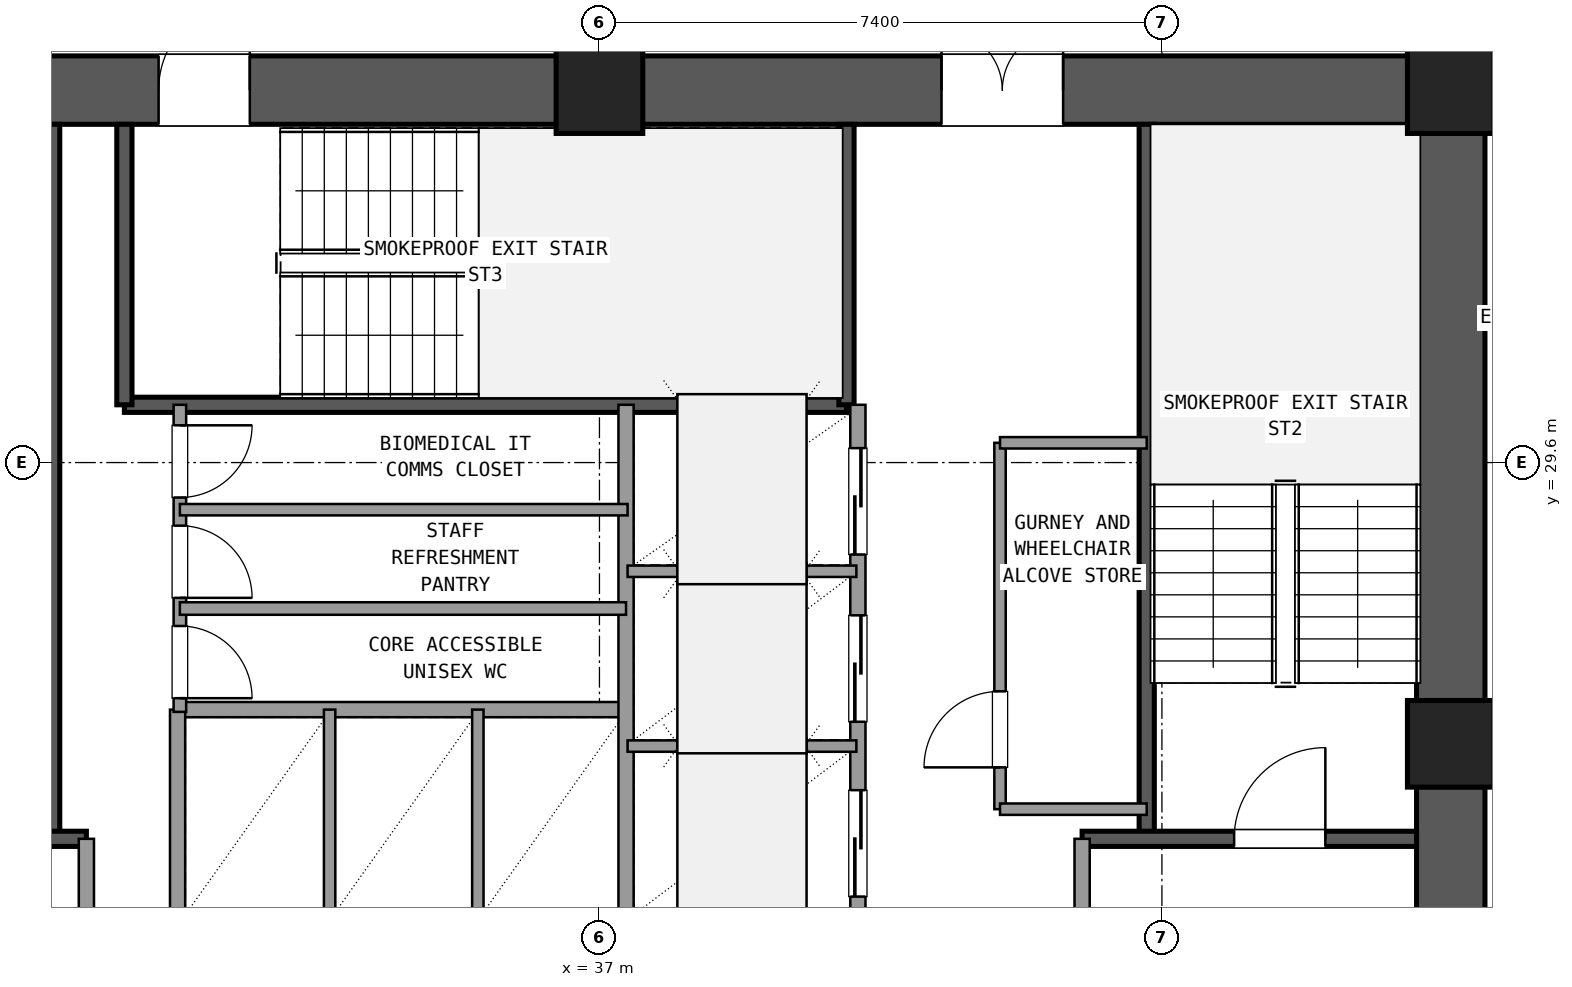
"""IFC4 building model, lengths in metres.
Left out: names, types, materials, properties, quantities, classifications, styles, units other than length and angle.
Written with IfcOpenShell. Run it as: python <this file> out.ifc"""

import sys

from ifc_helpers import new_model, si_unit, direction, frame, frame_2d, origin, origin_2d, place, context, subcontext, project, spatial, rectangle, extrude, element, fill, save


model = new_model("IFC4")
c1 = context("Model", 3, precision=1e-05, world=origin(), true_north=direction((0.0, 1.0)))
c2 = subcontext(c1, "Body", "Model", "MODEL_VIEW")
j1 = project(units=[si_unit("LENGTHUNIT", "METRE"), si_unit("PLANEANGLEUNIT", "RADIAN")], contexts=[c1])
p1 = place(None, origin())
s1 = spatial("IfcSite", under=j1, at=p1, CompositionType="ELEMENT")
p2 = place(p1, origin())
s2 = spatial("IfcBuilding", under=s1, at=p2, CompositionType="ELEMENT")
p3 = place(p2, frame((0.0, 0.0, 45.54)))
s3 = spatial("IfcBuildingStorey", under=s2, at=p3, CompositionType="ELEMENT", Elevation=45.54)
for number, where, z_axis, x_axis in (
    (1, (48.2, 25.9, 0.0), (0.0, 0.0, 1.0), (1.0, 0.0, 0.0)),
    (2, (48.2, 34.5, 0.0), (0.0, 0.0, 1.0), (1.0, 0.0, 0.0)),
    (3, (37.0, 34.5, 0.0), (0.0, 0.0, 1.0), (1.0, 0.0, 0.0)),
):
    element("IfcColumn", number, at=place(p3, frame(where, z_axis=z_axis, x_axis=x_axis)), inside=s3, PredefinedType="COLUMN", context=c2, shape_type="SweptSolid", body=[
        extrude(rectangle(XDim=1.14, YDim=1.14, at=origin_2d()), origin(), (0.0, 0.0, 1.0), 3.6),
    ])
p4 = place(p3, frame((48.2, 17.865, 0.0), z_axis=(0.0, 0.0, 1.0), x_axis=(0.0, 1.0, 0.0)))
e4 = element("IfcWall", 4, at=p4, inside=s3, PredefinedType="SHEAR", context=c2, shape_type="SweptSolid", body=[
    extrude(rectangle(XDim=7.47, YDim=0.9, at=frame_2d((3.735, 0.0))), origin(), (0.0, 0.0, 1.0), 3.32),
])
p5 = place(p4, frame((4.185, 0.0, 0.0)))
e5 = element("IfcOpeningElement", 5, at=p5, cuts=e4, PredefinedType="OPENING", context=c2, shape_type="SweptSolid", body=[
    extrude(rectangle(XDim=1.2, YDim=2.15, at=frame_2d((0.6, 1.075))), frame((0.0, 0.46, 0.0), z_axis=(0.0, -1.0, 0.0), x_axis=(1.0, 0.0, 0.0)), (0.0, 0.0, 1.0), 0.92),
])
p6 = place(p3, frame((48.2, 26.465, 0.0), z_axis=(0.0, 0.0, 1.0), x_axis=(0.0, 1.0, 0.0)))
e6 = element("IfcWall", 6, at=p6, inside=s3, PredefinedType="SHEAR", context=c2, shape_type="SweptSolid", body=[
    extrude(rectangle(XDim=7.47, YDim=0.9, at=frame_2d((3.735, 0.0))), origin(), (0.0, 0.0, 1.0), 3.32),
])
p7 = place(p3, frame((47.635, 34.5, 0.0), z_axis=(0.0, 0.0, 1.0), x_axis=(-1.0, 0.0, 0.0)))
e7 = element("IfcWall", 7, at=p7, inside=s3, PredefinedType="SHEAR", context=c2, shape_type="SweptSolid", body=[
    extrude(rectangle(XDim=10.07, YDim=0.9, at=frame_2d((5.035, 0.0))), origin(), (0.0, 0.0, 1.0), 3.32),
])
p8 = place(p7, frame((4.535, 0.0, 0.0)))
e8 = element("IfcOpeningElement", 8, at=p8, cuts=e7, PredefinedType="OPENING", context=c2, shape_type="SweptSolid", body=[
    extrude(rectangle(XDim=1.6, YDim=2.2, at=frame_2d((0.8, 1.1))), frame((0.0, 0.46, 0.0), z_axis=(0.0, -1.0, 0.0), x_axis=(1.0, 0.0, 0.0)), (0.0, 0.0, 1.0), 0.92),
])
p9 = place(p3, frame((36.435, 34.5, 0.0), z_axis=(0.0, 0.0, 1.0), x_axis=(-1.0, 0.0, 0.0)))
e9 = element("IfcWall", 9, at=p9, inside=s3, PredefinedType="SHEAR", context=c2, shape_type="SweptSolid", body=[
    extrude(rectangle(XDim=10.07, YDim=0.9, at=frame_2d((5.035, 0.0))), origin(), (0.0, 0.0, 1.0), 3.32),
])
p10 = place(p9, frame((4.035, 0.0, 0.0)))
e10 = element("IfcOpeningElement", 10, at=p10, cuts=e9, PredefinedType="OPENING", context=c2, shape_type="SweptSolid", body=[
    extrude(rectangle(XDim=1.2, YDim=2.15, at=frame_2d((0.6, 1.075))), frame((0.0, 0.46, 0.0), z_axis=(0.0, -1.0, 0.0), x_axis=(1.0, 0.0, 0.0)), (0.0, 0.0, 1.0), 0.92),
])
p11 = place(p3, frame((29.8, 24.65, 0.0), z_axis=(0.0, 0.0, 1.0), x_axis=(0.0, 1.0, 0.0)))
e11 = element("IfcWall", 11, at=p11, inside=s3, PredefinedType="SHEAR", context=c2, shape_type="SweptSolid", body=[
    extrude(rectangle(XDim=9.4, YDim=0.2, at=frame_2d((4.7, 0.0))), origin(), (0.0, 0.0, 1.0), 3.32),
])
p12 = place(p3, frame((26.25, 24.65, 0.0), z_axis=(0.0, 0.0, 1.0), x_axis=(1.0, 0.0, 0.0)))
e12 = element("IfcWall", 12, at=p12, inside=s3, PredefinedType="SHEAR", context=c2, shape_type="SweptSolid", body=[
    extrude(rectangle(XDim=4.0, YDim=0.2, at=frame_2d((2.0, 0.0))), origin(), (0.0, 0.0, 1.0), 3.32),
])
p13 = place(p12, frame((1.0, 0.0, 0.0)))
e13 = element("IfcOpeningElement", 13, at=p13, cuts=e12, PredefinedType="OPENING", context=c2, shape_type="SweptSolid", body=[
    extrude(rectangle(XDim=1.2, YDim=2.15, at=frame_2d((0.6, 1.075))), frame((0.0, 0.11, 0.0), z_axis=(0.0, -1.0, 0.0), x_axis=(1.0, 0.0, 0.0)), (0.0, 0.0, 1.0), 0.22),
])
p14 = place(p3, frame((44.2, 24.65, 0.0), z_axis=(0.0, 0.0, 1.0), x_axis=(0.0, 1.0, 0.0)))
e14 = element("IfcWall", 14, at=p14, inside=s3, PredefinedType="SHEAR", context=c2, shape_type="SweptSolid", body=[
    extrude(rectangle(XDim=9.4, YDim=0.2, at=frame_2d((4.7, 0.0))), origin(), (0.0, 0.0, 1.0), 3.32),
])
p15 = place(p3, frame((43.35, 24.65, 0.0), z_axis=(0.0, 0.0, 1.0), x_axis=(1.0, 0.0, 0.0)))
e15 = element("IfcWall", 15, at=p15, inside=s3, PredefinedType="SHEAR", context=c2, shape_type="SweptSolid", body=[
    extrude(rectangle(XDim=4.4, YDim=0.2, at=frame_2d((2.2, 0.0))), origin(), (0.0, 0.0, 1.0), 3.32),
])
p16 = place(p15, frame((2.0, 0.0, 0.0)))
e16 = element("IfcOpeningElement", 16, at=p16, cuts=e15, PredefinedType="OPENING", context=c2, shape_type="SweptSolid", body=[
    extrude(rectangle(XDim=1.2, YDim=2.15, at=frame_2d((0.6, 1.075))), frame((0.0, 0.11, 0.0), z_axis=(0.0, -1.0, 0.0), x_axis=(1.0, 0.0, 0.0)), (0.0, 0.0, 1.0), 0.22),
])
p17 = place(p3, frame((30.75, 30.36, 0.0), z_axis=(0.0, 0.0, 1.0), x_axis=(1.0, 0.0, 0.0)))
e17 = element("IfcWall", 17, at=p17, inside=s3, PredefinedType="SHEAR", context=c2, shape_type="SweptSolid", body=[
    extrude(rectangle(XDim=9.5, YDim=0.2, at=frame_2d((4.75, 0.0))), origin(), (0.0, 0.0, 1.0), 3.32),
])
for number, where, z_axis, x_axis in (
    (18, (30.75, 30.36, 0.0), (0.0, 0.0, 1.0), (0.0, 1.0, 0.0)),
    (19, (40.25, 30.36, 0.0), (0.0, 0.0, 1.0), (0.0, 1.0, 0.0)),
):
    element("IfcWall", number, at=place(p3, frame(where, z_axis=z_axis, x_axis=x_axis)), inside=s3, PredefinedType="SHEAR", context=c2, shape_type="SweptSolid", body=[
        extrude(rectangle(XDim=3.69, YDim=0.2, at=frame_2d((1.845, 0.0))), origin(), (0.0, 0.0, 1.0), 3.32),
    ])
p18 = place(p3, frame((30.25, 17.75, 0.0), z_axis=(0.0, 0.0, 1.0), x_axis=(0.0, 1.0, 0.0)))
e20 = element("IfcWall", 20, at=p18, inside=s3, PredefinedType="SOLIDWALL", context=c2, shape_type="SweptSolid", body=[
    extrude(rectangle(XDim=6.9, YDim=0.2, at=frame_2d((3.45, 0.0))), origin(), (0.0, 0.0, 1.0), 2.61),
])
p19 = place(p18, frame((4.15, 0.0, 0.0)))
e21 = element("IfcOpeningElement", 21, at=p19, cuts=e20, PredefinedType="OPENING", context=c2, shape_type="SweptSolid", body=[
    extrude(rectangle(XDim=1.2, YDim=2.15, at=frame_2d((0.6, 1.075))), frame((0.0, 0.11, 0.0), z_axis=(0.0, -1.0, 0.0), x_axis=(1.0, 0.0, 0.0)), (0.0, 0.0, 1.0), 0.22),
])
p20 = place(p3, frame((43.35, 17.75, 0.0), z_axis=(0.0, 0.0, 1.0), x_axis=(0.0, 1.0, 0.0)))
e22 = element("IfcWall", 22, at=p20, inside=s3, PredefinedType="SOLIDWALL", context=c2, shape_type="SweptSolid", body=[
    extrude(rectangle(XDim=6.9, YDim=0.2, at=frame_2d((3.45, 0.0))), origin(), (0.0, 0.0, 1.0), 2.61),
])
p21 = place(p20, frame((4.15, 0.0, 0.0)))
e23 = element("IfcOpeningElement", 23, at=p21, cuts=e22, PredefinedType="OPENING", context=c2, shape_type="SweptSolid", body=[
    extrude(rectangle(XDim=1.2, YDim=2.15, at=frame_2d((0.6, 1.075))), frame((0.0, 0.11, 0.0), z_axis=(0.0, -1.0, 0.0), x_axis=(1.0, 0.0, 0.0)), (0.0, 0.0, 1.0), 0.22),
])
p22 = place(p3, frame((31.45, 26.35, 0.0), z_axis=(0.0, 0.0, 1.0), x_axis=(1.0, 0.0, 0.0)))
e24 = element("IfcWall", 24, at=p22, inside=s3, PredefinedType="SOLIDWALL", context=c2, shape_type="SweptSolid", body=[
    extrude(rectangle(XDim=5.9, YDim=0.2, at=frame_2d((2.95, 0.0))), origin(), (0.0, 0.0, 1.0), 2.61),
])
p23 = place(p3, frame((31.45, 23.54, 0.0), z_axis=(0.0, 0.0, 1.0), x_axis=(0.0, 1.0, 0.0)))
e25 = element("IfcWall", 25, at=p23, inside=s3, PredefinedType="SOLIDWALL", context=c2, shape_type="SweptSolid", body=[
    extrude(rectangle(XDim=2.81, YDim=0.2, at=frame_2d((1.405, 0.0))), origin(), (0.0, 0.0, 1.0), 2.61),
])
for number, where, z_axis, x_axis in (
    (26, (33.45, 23.54, 0.0), (0.0, 0.0, 1.0), (0.0, 1.0, 0.0)),
    (27, (35.4, 23.54, 0.0), (0.0, 0.0, 1.0), (0.0, 1.0, 0.0)),
):
    element("IfcWall", number, at=place(p3, frame(where, z_axis=z_axis, x_axis=x_axis)), inside=s3, PredefinedType="PARTITIONING", context=c2, shape_type="SweptSolid", body=[
        extrude(rectangle(XDim=2.81, YDim=0.15, at=frame_2d((1.405, 0.0))), origin(), (0.0, 0.0, 1.0), 2.61),
    ])
p24 = place(p3, frame((37.35, 23.54, 0.0), z_axis=(0.0, 0.0, 1.0), x_axis=(0.0, 1.0, 0.0)))
e28 = element("IfcWall", 28, at=p24, inside=s3, PredefinedType="SOLIDWALL", context=c2, shape_type="SweptSolid", body=[
    extrude(rectangle(XDim=6.82, YDim=0.2, at=frame_2d((3.41, 0.0))), origin(), (0.0, 0.0, 1.0), 2.61),
])
p25 = place(p3, frame((40.4, 23.54, 0.0), z_axis=(0.0, 0.0, 1.0), x_axis=(0.0, 1.0, 0.0)))
e29 = element("IfcWall", 29, at=p25, inside=s3, PredefinedType="SOLIDWALL", context=c2, shape_type="SweptSolid", body=[
    extrude(rectangle(XDim=6.82, YDim=0.2, at=frame_2d((3.41, 0.0))), origin(), (0.0, 0.0, 1.0), 2.61),
])
p26 = place(p25, frame((0.35, 0.0, 0.0)))
e30 = element("IfcOpeningElement", 30, at=p26, cuts=e29, PredefinedType="OPENING", context=c2, shape_type="SweptSolid", body=[
    extrude(rectangle(XDim=1.4, YDim=2.2, at=frame_2d((0.7, 1.1))), frame((0.0, 0.11, 0.0), z_axis=(0.0, -1.0, 0.0), x_axis=(1.0, 0.0, 0.0)), (0.0, 0.0, 1.0), 0.22),
])
p27 = place(p25, frame((2.65, 0.0, 0.0)))
e31 = element("IfcOpeningElement", 31, at=p27, cuts=e29, PredefinedType="OPENING", context=c2, shape_type="SweptSolid", body=[
    extrude(rectangle(XDim=1.4, YDim=2.2, at=frame_2d((0.7, 1.1))), frame((0.0, 0.11, 0.0), z_axis=(0.0, -1.0, 0.0), x_axis=(1.0, 0.0, 0.0)), (0.0, 0.0, 1.0), 0.22),
])
p28 = place(p25, frame((4.85, 0.0, 0.0)))
e32 = element("IfcOpeningElement", 32, at=p28, cuts=e29, PredefinedType="OPENING", context=c2, shape_type="SweptSolid", body=[
    extrude(rectangle(XDim=1.4, YDim=2.2, at=frame_2d((0.7, 1.1))), frame((0.0, 0.11, 0.0), z_axis=(0.0, -1.0, 0.0), x_axis=(1.0, 0.0, 0.0)), (0.0, 0.0, 1.0), 0.22),
])
for number, where, z_axis, x_axis in (
    (33, (37.37, 25.87, 0.0), (0.0, 0.0, 1.0), (1.0, 0.0, 0.0)),
    (34, (37.37, 28.17, 0.0), (0.0, 0.0, 1.0), (1.0, 0.0, 0.0)),
):
    element("IfcWall", number, at=place(p3, frame(where, z_axis=z_axis, x_axis=x_axis)), inside=s3, PredefinedType="PARTITIONING", context=c2, shape_type="SweptSolid", body=[
        extrude(rectangle(XDim=3.01, YDim=0.15, at=frame_2d((1.505, 0.0))), origin(), (0.0, 0.0, 1.0), 2.61),
    ])
p29 = place(p3, frame((42.27, 25.04, 0.0), z_axis=(0.0, 0.0, 1.0), x_axis=(0.0, 1.0, 0.0)))
e35 = element("IfcWall", 35, at=p29, inside=s3, PredefinedType="PARTITIONING", context=c2, shape_type="SweptSolid", body=[
    extrude(rectangle(XDim=4.82, YDim=0.15, at=frame_2d((2.41, 0.0))), origin(), (0.0, 0.0, 1.0), 2.61),
])
p30 = place(p29, frame((0.55, 0.0, 0.0)))
e36 = element("IfcOpeningElement", 36, at=p30, cuts=e35, PredefinedType="OPENING", context=c2, shape_type="SweptSolid", body=[
    extrude(rectangle(XDim=1.0, YDim=2.15, at=frame_2d((0.5, 1.075))), frame((0.0, 0.085, 0.0), z_axis=(0.0, -1.0, 0.0), x_axis=(1.0, 0.0, 0.0)), (0.0, 0.0, 1.0), 0.17),
])
for number, where, z_axis, x_axis in (
    (37, (42.27, 25.04, 0.0), (0.0, 0.0, 1.0), (1.0, 0.0, 0.0)),
    (38, (42.27, 29.86, 0.0), (0.0, 0.0, 1.0), (1.0, 0.0, 0.0)),
):
    element("IfcWall", number, at=place(p3, frame(where, z_axis=z_axis, x_axis=x_axis)), inside=s3, PredefinedType="PARTITIONING", context=c2, shape_type="SweptSolid", body=[
        extrude(rectangle(XDim=1.93, YDim=0.15, at=frame_2d((0.965, 0.0))), origin(), (0.0, 0.0, 1.0), 2.61),
    ])
p31 = place(p3, frame((31.48, 26.32, 0.0), z_axis=(0.0, 0.0, 1.0), x_axis=(0.0, 1.0, 0.0)))
e39 = element("IfcWall", 39, at=p31, inside=s3, PredefinedType="PLUMBINGWALL", context=c2, shape_type="SweptSolid", body=[
    extrude(rectangle(XDim=4.04, YDim=0.165, at=frame_2d((2.02, 0.0))), origin(), (0.0, 0.0, 1.0), 2.61),
])
p32 = place(p31, frame((0.18, 0.0, 0.0)))
e40 = element("IfcOpeningElement", 40, at=p32, cuts=e39, PredefinedType="OPENING", context=c2, shape_type="SweptSolid", body=[
    extrude(rectangle(XDim=0.95, YDim=2.1, at=frame_2d((0.475, 1.05))), frame((0.0, 0.093, 0.0), z_axis=(0.0, -1.0, 0.0), x_axis=(1.0, 0.0, 0.0)), (0.0, 0.0, 1.0), 0.185),
])
p33 = place(p31, frame((1.5, 0.0, 0.0)))
e41 = element("IfcOpeningElement", 41, at=p33, cuts=e39, PredefinedType="OPENING", context=c2, shape_type="SweptSolid", body=[
    extrude(rectangle(XDim=0.95, YDim=2.1, at=frame_2d((0.475, 1.05))), frame((0.0, 0.093, 0.0), z_axis=(0.0, -1.0, 0.0), x_axis=(1.0, 0.0, 0.0)), (0.0, 0.0, 1.0), 0.185),
])
p34 = place(p31, frame((2.82, 0.0, 0.0)))
e42 = element("IfcOpeningElement", 42, at=p34, cuts=e39, PredefinedType="OPENING", context=c2, shape_type="SweptSolid", body=[
    extrude(rectangle(XDim=0.95, YDim=2.1, at=frame_2d((0.475, 1.05))), frame((0.0, 0.093, 0.0), z_axis=(0.0, -1.0, 0.0), x_axis=(1.0, 0.0, 0.0)), (0.0, 0.0, 1.0), 0.185),
])
p35 = place(p3, frame((31.48, 27.68, 0.0), z_axis=(0.0, 0.0, 1.0), x_axis=(1.0, 0.0, 0.0)))
e43 = element("IfcWall", 43, at=p35, inside=s3, PredefinedType="PLUMBINGWALL", context=c2, shape_type="SweptSolid", body=[
    extrude(rectangle(XDim=5.87, YDim=0.165, at=frame_2d((2.935, 0.0))), origin(), (0.0, 0.0, 1.0), 2.61),
])
p36 = place(p3, frame((31.48, 28.98, 0.0), z_axis=(0.0, 0.0, 1.0), x_axis=(1.0, 0.0, 0.0)))
e44 = element("IfcWall", 44, at=p36, inside=s3, PredefinedType="PARTITIONING", context=c2, shape_type="SweptSolid", body=[
    extrude(rectangle(XDim=5.89, YDim=0.15, at=frame_2d((2.945, 0.0))), origin(), (0.0, 0.0, 1.0), 2.61),
])
p37 = place(p3, frame((37.0, 34.95, 0.0), z_axis=(0.0, 0.0, 1.0), x_axis=(0.0, 1.0, 0.0)))
e45 = element("IfcWall", 45, at=p37, inside=s3, PredefinedType="PARTITIONING", context=c2, shape_type="SweptSolid", body=[
    extrude(rectangle(XDim=2.7, YDim=0.18, at=frame_2d((1.35, 0.0))), origin(), (0.0, 0.0, 1.0), 2.61),
])
p38 = place(p37, frame((0.35, 0.0, 0.0)))
e46 = element("IfcOpeningElement", 46, at=p38, cuts=e45, PredefinedType="OPENING", context=c2, shape_type="SweptSolid", body=[
    extrude(rectangle(XDim=2.0, YDim=2.2, at=frame_2d((1.0, 1.1))), frame((0.0, 0.1, 0.0), z_axis=(0.0, -1.0, 0.0), x_axis=(1.0, 0.0, 0.0)), (0.0, 0.0, 1.0), 0.2),
])
p39 = place(p16, origin())
e47 = element("IfcDoor", 47, at=p39, inside=s3, OperationType="SINGLE_SWING_RIGHT", PredefinedType="DOOR", context=c2, shape_type="SweptSolid", body=[
    extrude(rectangle(XDim=1.2, YDim=2.15, at=frame_2d((0.6, 1.075))), frame((0.0, 0.025, 0.0), z_axis=(0.0, -1.0, 0.0), x_axis=(1.0, 0.0, 0.0)), (0.0, 0.0, 1.0), 0.05),
])
fill(e16, e47)
p40 = place(p8, frame((1.6, 0.0, 0.0), z_axis=(0.0, 0.0, 1.0), x_axis=(-1.0, 0.0, 0.0)))
e48 = element("IfcDoor", 48, at=p40, inside=s3, OperationType="DOUBLE_DOOR_SINGLE_SWING", PredefinedType="DOOR", context=c2, shape_type="SweptSolid", body=[
    extrude(rectangle(XDim=1.6, YDim=2.2, at=frame_2d((0.8, 1.1))), frame((0.0, 0.025, 0.0), z_axis=(0.0, -1.0, 0.0), x_axis=(1.0, 0.0, 0.0)), (0.0, 0.0, 1.0), 0.05),
])
fill(e8, e48)
p41 = place(p10, frame((1.2, 0.0, 0.0), z_axis=(0.0, 0.0, 1.0), x_axis=(-1.0, 0.0, 0.0)))
e49 = element("IfcDoor", 49, at=p41, inside=s3, OperationType="SINGLE_SWING_LEFT", PredefinedType="DOOR", context=c2, shape_type="SweptSolid", body=[
    extrude(rectangle(XDim=1.2, YDim=2.15, at=frame_2d((0.6, 1.075))), frame((0.0, 0.025, 0.0), z_axis=(0.0, -1.0, 0.0), x_axis=(1.0, 0.0, 0.0)), (0.0, 0.0, 1.0), 0.05),
])
fill(e10, e49)
p42 = place(p26, origin())
e50 = element("IfcDoor", 50, at=p42, inside=s3, OperationType="SLIDING_TO_LEFT", PredefinedType="DOOR", context=c2, shape_type="SweptSolid", body=[
    extrude(rectangle(XDim=1.4, YDim=2.2, at=frame_2d((0.7, 1.1))), frame((0.0, 0.025, 0.0), z_axis=(0.0, -1.0, 0.0), x_axis=(1.0, 0.0, 0.0)), (0.0, 0.0, 1.0), 0.05),
])
fill(e30, e50)
p43 = place(p27, origin())
e51 = element("IfcDoor", 51, at=p43, inside=s3, OperationType="SLIDING_TO_LEFT", PredefinedType="DOOR", context=c2, shape_type="SweptSolid", body=[
    extrude(rectangle(XDim=1.4, YDim=2.2, at=frame_2d((0.7, 1.1))), frame((0.0, 0.025, 0.0), z_axis=(0.0, -1.0, 0.0), x_axis=(1.0, 0.0, 0.0)), (0.0, 0.0, 1.0), 0.05),
])
fill(e31, e51)
p44 = place(p28, origin())
e52 = element("IfcDoor", 52, at=p44, inside=s3, OperationType="SLIDING_TO_RIGHT", PredefinedType="DOOR", context=c2, shape_type="SweptSolid", body=[
    extrude(rectangle(XDim=1.4, YDim=2.2, at=frame_2d((0.7, 1.1))), frame((0.0, 0.025, 0.0), z_axis=(0.0, -1.0, 0.0), x_axis=(1.0, 0.0, 0.0)), (0.0, 0.0, 1.0), 0.05),
])
fill(e32, e52)
p45 = place(p30, origin())
e53 = element("IfcDoor", 53, at=p45, inside=s3, OperationType="SINGLE_SWING_LEFT", PredefinedType="DOOR", context=c2, shape_type="SweptSolid", body=[
    extrude(rectangle(XDim=1.0, YDim=2.15, at=frame_2d((0.5, 1.075))), frame((0.0, 0.025, 0.0), z_axis=(0.0, -1.0, 0.0), x_axis=(1.0, 0.0, 0.0)), (0.0, 0.0, 1.0), 0.05),
])
fill(e36, e53)
p46 = place(p32, frame((0.95, 0.0, 0.0), z_axis=(0.0, 0.0, 1.0), x_axis=(-1.0, 0.0, 0.0)))
e54 = element("IfcDoor", 54, at=p46, inside=s3, OperationType="SINGLE_SWING_LEFT", PredefinedType="DOOR", context=c2, shape_type="SweptSolid", body=[
    extrude(rectangle(XDim=0.95, YDim=2.1, at=frame_2d((0.475, 1.05))), frame((0.0, 0.025, 0.0), z_axis=(0.0, -1.0, 0.0), x_axis=(1.0, 0.0, 0.0)), (0.0, 0.0, 1.0), 0.05),
])
fill(e40, e54)
p47 = place(p33, frame((0.95, 0.0, 0.0), z_axis=(0.0, 0.0, 1.0), x_axis=(-1.0, 0.0, 0.0)))
e55 = element("IfcDoor", 55, at=p47, inside=s3, OperationType="SINGLE_SWING_LEFT", PredefinedType="DOOR", context=c2, shape_type="SweptSolid", body=[
    extrude(rectangle(XDim=0.95, YDim=2.1, at=frame_2d((0.475, 1.05))), frame((0.0, 0.025, 0.0), z_axis=(0.0, -1.0, 0.0), x_axis=(1.0, 0.0, 0.0)), (0.0, 0.0, 1.0), 0.05),
])
fill(e41, e55)
p48 = place(p34, frame((0.95, 0.0, 0.0), z_axis=(0.0, 0.0, 1.0), x_axis=(-1.0, 0.0, 0.0)))
e56 = element("IfcDoor", 56, at=p48, inside=s3, OperationType="SINGLE_SWING_RIGHT", PredefinedType="DOOR", context=c2, shape_type="SweptSolid", body=[
    extrude(rectangle(XDim=0.95, YDim=2.1, at=frame_2d((0.475, 1.05))), frame((0.0, 0.025, 0.0), z_axis=(0.0, -1.0, 0.0), x_axis=(1.0, 0.0, 0.0)), (0.0, 0.0, 1.0), 0.05),
])
fill(e42, e56)
save(model, sys.argv[1])
